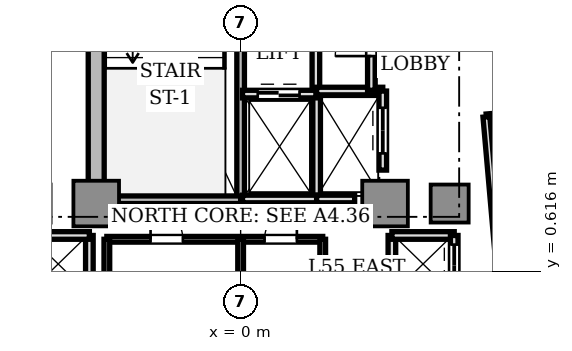
"""IFC4 building model, lengths in metres.
Left out: names, types, materials, properties, quantities, classifications, styles, units other than length and angle.
Written with IfcOpenShell. Run it as: python <this file> out.ifc"""

import sys

from ifc_helpers import new_model, si_unit, direction, frame, frame_2d, origin, origin_2d, place, context, subcontext, project, spatial, rectangle, extrude, source, transform, mapped, element, fill, save


model = new_model("IFC4")
c1 = context("Model", 3, precision=1e-05, world=origin(), true_north=direction((0.0, 1.0)))
c2 = subcontext(c1, "Body", "Model", "MODEL_VIEW")
j1 = project(units=[si_unit("LENGTHUNIT", "METRE"), si_unit("PLANEANGLEUNIT", "RADIAN")], contexts=[c1])
p1 = place(None, origin())
s1 = spatial("IfcSite", under=j1, at=p1, CompositionType="ELEMENT")
p2 = place(p1, origin())
s2 = spatial("IfcBuilding", under=s1, at=p2, CompositionType="ELEMENT")
p3 = place(p2, frame((0.0, 0.0, 198.65)))
s3 = spatial("IfcBuildingStorey", under=s2, at=p3, CompositionType="ELEMENT", Elevation=198.65)
p4 = place(p3, frame((-3.8, 2.85, 0.0), z_axis=(0.0, 0.0, 1.0), x_axis=(0.0, 1.0, 0.0)))
e1 = element("IfcWall", 1, at=p4, inside=s3, PredefinedType="SHEAR", context=c2, shape_type="SweptSolid", body=[
    extrude(rectangle(XDim=6.9, YDim=0.42, at=frame_2d((3.45, 0.0))), origin(), (0.0, 0.0, 1.0), 3.03),
])
m1 = source(origin(), c2, "Body", "SweptSolid", [
    extrude(rectangle(XDim=1.2, YDim=1.2, at=origin_2d()), origin(), (0.0, 0.0, 1.0), 3.03),
])
for number, where, z_axis, x_axis in (
    (2, (-3.8, 2.4, 0.0), (0.0, 0.0, 1.0), (1.0, 0.0, 0.0)),
    (3, (3.8, 2.4, 0.0), (0.0, 0.0, 1.0), (1.0, 0.0, 0.0)),
):
    element("IfcColumn", number, at=place(p3, frame(where, z_axis=z_axis, x_axis=x_axis)), inside=s3, PredefinedType="COLUMN", context=c2, shape_type="MappedRepresentation", body=[
        mapped(m1, transform((0.0, 0.0, 0.0), scale=1.0)),
    ])
m2 = source(origin(), c2, "Body", "SweptSolid", [
    extrude(rectangle(XDim=1.0, YDim=1.0, at=origin_2d()), origin(), (0.0, 0.0, 1.0), 3.03),
])
p5 = place(p3, frame((5.5, 2.4, 0.0), z_axis=(0.0, 0.0, 1.0), x_axis=(1.0, 0.0, 0.0)))
e4 = element("IfcColumn", 4, at=p5, inside=s3, PredefinedType="COLUMN", context=c2, shape_type="MappedRepresentation", body=[
    mapped(m2, transform((0.0, 0.0, 0.0), scale=1.0)),
])
p6 = place(p3, frame((0.0, 2.5, 0.0), z_axis=(0.0, 0.0, 1.0), x_axis=(0.0, 1.0, 0.0)))
e5 = element("IfcWall", 5, at=p6, inside=s3, PredefinedType="SOLIDWALL", context=c2, shape_type="SweptSolid", body=[
    extrude(rectangle(XDim=7.68, YDim=0.2, at=frame_2d((3.84, 0.0))), origin(), (0.0, 0.0, 1.0), 3.03),
])
p7 = place(p6, frame((6.36, 0.0, 0.0)))
e6 = element("IfcOpeningElement", 6, at=p7, cuts=e5, PredefinedType="OPENING", context=c2, shape_type="SweptSolid", body=[
    extrude(rectangle(XDim=1.1, YDim=2.15, at=frame_2d((0.55, 1.075))), frame((0.0, 0.11, 0.0), z_axis=(0.0, -1.0, 0.0), x_axis=(1.0, 0.0, 0.0)), (0.0, 0.0, 1.0), 0.22),
])
p8 = place(p3, frame((-3.72, 2.5, 0.0), z_axis=(0.0, 0.0, 1.0), x_axis=(1.0, 0.0, 0.0)))
e7 = element("IfcWall", 7, at=p8, inside=s3, PredefinedType="SOLIDWALL", context=c2, shape_type="SweptSolid", body=[
    extrude(rectangle(XDim=3.72, YDim=0.2, at=frame_2d((1.86, 0.0))), origin(), (0.0, 0.0, 1.0), 3.03),
])
p9 = place(p3, frame((1.98, 5.32, 0.0), z_axis=(0.0, 0.0, 1.0), x_axis=(0.0, 1.0, 0.0)))
e8 = element("IfcWall", 8, at=p9, inside=s3, PredefinedType="SOLIDWALL", context=c2, shape_type="SweptSolid", body=[
    extrude(rectangle(XDim=4.66, YDim=0.2, at=frame_2d((2.33, 0.0))), origin(), (0.0, 0.0, 1.0), 2.58),
])
p10 = place(p9, frame((3.04, 0.0, 0.0)))
e9 = element("IfcOpeningElement", 9, at=p10, cuts=e8, PredefinedType="OPENING", context=c2, shape_type="SweptSolid", body=[
    extrude(rectangle(XDim=0.85, YDim=2.1, at=frame_2d((0.425, 1.05))), frame((0.0, 0.11, 0.0), z_axis=(0.0, -1.0, 0.0), x_axis=(1.0, 0.0, 0.0)), (0.0, 0.0, 1.0), 0.22),
])
p11 = place(p3, frame((2.0, 2.5, 0.0), z_axis=(0.0, 0.0, 1.0), x_axis=(0.0, 1.0, 0.0)))
e10 = element("IfcWall", 10, at=p11, inside=s3, PredefinedType="SOLIDWALL", context=c2, shape_type="SweptSolid", body=[
    extrude(rectangle(XDim=2.78, YDim=0.2, at=frame_2d((1.39, 0.0))), origin(), (0.0, 0.0, 1.0), 2.58),
])
p12 = place(p3, frame((0.05, 2.52, 0.0), z_axis=(0.0, 0.0, 1.0), x_axis=(1.0, 0.0, 0.0)))
e11 = element("IfcWall", 11, at=p12, inside=s3, PredefinedType="SOLIDWALL", context=c2, shape_type="SweptSolid", body=[
    extrude(rectangle(XDim=1.95, YDim=0.2, at=frame_2d((0.975, 0.0))), origin(), (0.0, 0.0, 1.0), 2.58),
])
p13 = place(p3, frame((0.05, 5.28, 0.0), z_axis=(0.0, 0.0, 1.0), x_axis=(1.0, 0.0, 0.0)))
e12 = element("IfcWall", 12, at=p13, inside=s3, PredefinedType="SOLIDWALL", context=c2, shape_type="SweptSolid", body=[
    extrude(rectangle(XDim=1.93, YDim=0.2, at=frame_2d((0.965, 0.0))), origin(), (0.0, 0.0, 1.0), 2.58),
])
p14 = place(p13, frame((0.4, 0.0, 0.0)))
e13 = element("IfcOpeningElement", 13, at=p14, cuts=e12, PredefinedType="OPENING", context=c2, shape_type="SweptSolid", body=[
    extrude(rectangle(XDim=1.1, YDim=2.2, at=frame_2d((0.55, 1.1))), frame((0.0, 0.11, 0.0), z_axis=(0.0, -1.0, 0.0), x_axis=(1.0, 0.0, 0.0)), (0.0, 0.0, 1.0), 0.22),
])
p15 = place(p3, frame((2.0, 2.52, 0.0), z_axis=(0.0, 0.0, 1.0), x_axis=(1.0, 0.0, 0.0)))
e14 = element("IfcWall", 14, at=p15, inside=s3, PredefinedType="SOLIDWALL", context=c2, shape_type="SweptSolid", body=[
    extrude(rectangle(XDim=1.0, YDim=0.2, at=frame_2d((0.5, 0.0))), origin(), (0.0, 0.0, 1.0), 2.58),
])
p16 = place(p3, frame((2.0, 5.36, 0.0), z_axis=(0.0, 0.0, 1.0), x_axis=(1.0, 0.0, 0.0)))
e15 = element("IfcWall", 15, at=p16, inside=s3, PredefinedType="SOLIDWALL", context=c2, shape_type="SweptSolid", body=[
    extrude(rectangle(XDim=1.74, YDim=0.2, at=frame_2d((0.87, 0.0))), origin(), (0.0, 0.0, 1.0), 2.58),
])
p17 = place(p3, frame((3.74, 3.28, 0.0), z_axis=(0.0, 0.0, 1.0), x_axis=(0.0, 1.0, 0.0)))
e16 = element("IfcWall", 16, at=p17, inside=s3, PredefinedType="SOLIDWALL", context=c2, shape_type="SweptSolid", body=[
    extrude(rectangle(XDim=2.08, YDim=0.2, at=frame_2d((1.04, 0.0))), origin(), (0.0, 0.0, 1.0), 2.58),
])
p18 = place(p17, frame((0.44, 0.0, 0.0)))
e17 = element("IfcOpeningElement", 17, at=p18, cuts=e16, PredefinedType="OPENING", context=c2, shape_type="SweptSolid", body=[
    extrude(rectangle(XDim=1.2, YDim=2.2, at=frame_2d((0.6, 1.1))), frame((0.0, 0.11, 0.0), z_axis=(0.0, -1.0, 0.0), x_axis=(1.0, 0.0, 0.0)), (0.0, 0.0, 1.0), 0.22),
])
p19 = place(p3, frame((3.98, -1.56, 0.0), z_axis=(0.0, 0.0, 1.0), x_axis=(0.0, 1.0, 0.0)))
e18 = element("IfcWall", 18, at=p19, inside=s3, PredefinedType="SOLIDWALL", context=c2, shape_type="SweptSolid", body=[
    extrude(rectangle(XDim=3.12, YDim=0.2, at=frame_2d((1.56, 0.0))), origin(), (0.0, 0.0, 1.0), 2.2),
])
p20 = place(p3, frame((3.98, 1.56, 0.0), z_axis=(0.0, 0.0, 1.0), x_axis=(1.0, 0.0, 0.0)))
e19 = element("IfcWall", 19, at=p20, inside=s3, PredefinedType="SOLIDWALL", context=c2, shape_type="SweptSolid", body=[
    extrude(rectangle(XDim=1.64, YDim=0.2, at=frame_2d((0.82, 0.0))), origin(), (0.0, 0.0, 1.0), 2.58),
])
p21 = place(p3, frame((5.62, 0.0, 0.0), z_axis=(0.0, 0.0, 1.0), x_axis=(0.0, 1.0, 0.0)))
e20 = element("IfcWall", 20, at=p21, inside=s3, PredefinedType="SOLIDWALL", context=c2, shape_type="SweptSolid", body=[
    extrude(rectangle(XDim=1.56, YDim=0.2, at=frame_2d((0.78, 0.0))), origin(), (0.0, 0.0, 1.0), 2.58),
])
p22 = place(p21, frame((0.22, 0.0, 0.0)))
e21 = element("IfcOpeningElement", 21, at=p22, cuts=e20, PredefinedType="OPENING", context=c2, shape_type="SweptSolid", body=[
    extrude(rectangle(XDim=1.1, YDim=2.2, at=frame_2d((0.55, 1.1))), frame((0.0, 0.11, 0.0), z_axis=(0.0, -1.0, 0.0), x_axis=(1.0, 0.0, 0.0)), (0.0, 0.0, 1.0), 0.22),
])
p23 = place(p3, frame((-3.98, -1.56, 0.0), z_axis=(0.0, 0.0, 1.0), x_axis=(0.0, 1.0, 0.0)))
e22 = element("IfcWall", 22, at=p23, inside=s3, PredefinedType="SOLIDWALL", context=c2, shape_type="SweptSolid", body=[
    extrude(rectangle(XDim=3.12, YDim=0.2, at=frame_2d((1.56, 0.0))), origin(), (0.0, 0.0, 1.0), 2.2),
])
p24 = place(p3, frame((-5.62, 1.56, 0.0), z_axis=(0.0, 0.0, 1.0), x_axis=(1.0, 0.0, 0.0)))
e23 = element("IfcWall", 23, at=p24, inside=s3, PredefinedType="SOLIDWALL", context=c2, shape_type="SweptSolid", body=[
    extrude(rectangle(XDim=1.64, YDim=0.2, at=frame_2d((0.82, 0.0))), origin(), (0.0, 0.0, 1.0), 2.58),
])
p25 = place(p3, frame((3.44, 5.38, 0.0), z_axis=(0.0, 0.0, 1.0), x_axis=(0.0, 1.0, 0.0)))
e24 = element("IfcWall", 24, at=p25, inside=s3, PredefinedType="SOLIDWALL", context=c2, shape_type="SweptSolid", body=[
    extrude(rectangle(XDim=2.77, YDim=0.2, at=frame_2d((1.385, 0.0))), origin(), (0.0, 0.0, 1.0), 2.58),
])
p26 = place(p25, frame((0.9, 0.0, 0.0)))
e25 = element("IfcOpeningElement", 25, at=p26, cuts=e24, PredefinedType="OPENING", context=c2, shape_type="SweptSolid", body=[
    extrude(rectangle(XDim=0.95, YDim=2.15, at=frame_2d((0.475, 1.075))), frame((0.0, 0.11, 0.0), z_axis=(0.0, -1.0, 0.0), x_axis=(1.0, 0.0, 0.0)), (0.0, 0.0, 1.0), 0.22),
])
p27 = place(p3, frame((-3.52, 1.46, 0.0), z_axis=(0.0, 0.0, 1.0), x_axis=(1.0, 0.0, 0.0)))
e26 = element("IfcWall", 26, at=p27, inside=s3, PredefinedType="PARTITIONING", context=c2, shape_type="SweptSolid", body=[
    extrude(rectangle(XDim=5.68, YDim=0.15, at=frame_2d((2.84, 0.0))), origin(), (0.0, 0.0, 1.0), 2.58),
])
p28 = place(p27, frame((1.15, 0.0, 0.0)))
e27 = element("IfcOpeningElement", 27, at=p28, cuts=e26, PredefinedType="OPENING", context=c2, shape_type="SweptSolid", body=[
    extrude(rectangle(XDim=0.85, YDim=2.1, at=frame_2d((0.425, 1.05))), frame((0.0, 0.085, 0.0), z_axis=(0.0, -1.0, 0.0), x_axis=(1.0, 0.0, 0.0)), (0.0, 0.0, 1.0), 0.17),
])
p29 = place(p27, frame((4.15, 0.0, 0.0)))
e28 = element("IfcOpeningElement", 28, at=p29, cuts=e26, PredefinedType="OPENING", context=c2, shape_type="SweptSolid", body=[
    extrude(rectangle(XDim=0.85, YDim=2.1, at=frame_2d((0.425, 1.05))), frame((0.0, 0.085, 0.0), z_axis=(0.0, -1.0, 0.0), x_axis=(1.0, 0.0, 0.0)), (0.0, 0.0, 1.0), 0.17),
])
p30 = place(p3, frame((-3.52, 0.1, 0.0), z_axis=(0.0, 0.0, 1.0), x_axis=(0.0, 1.0, 0.0)))
e29 = element("IfcWall", 29, at=p30, inside=s3, PredefinedType="PARTITIONING", context=c2, shape_type="SweptSolid", body=[
    extrude(rectangle(XDim=1.36, YDim=0.15, at=frame_2d((0.68, 0.0))), origin(), (0.0, 0.0, 1.0), 2.2),
])
for number, where, z_axis, x_axis in (
    (30, (2.16, 0.1, 0.0), (0.0, 0.0, 1.0), (0.0, 1.0, 0.0)),
    (31, (0.0, 0.1, 0.0), (0.0, 0.0, 1.0), (0.0, 1.0, 0.0)),
):
    element("IfcWall", number, at=place(p3, frame(where, z_axis=z_axis, x_axis=x_axis)), inside=s3, PredefinedType="PARTITIONING", context=c2, shape_type="SweptSolid", body=[
        extrude(rectangle(XDim=1.36, YDim=0.15, at=frame_2d((0.68, 0.0))), origin(), (0.0, 0.0, 1.0), 2.58),
    ])
p31 = place(p3, frame((6.467, 4.681, 0.0), z_axis=(0.0, 0.0, 1.0), x_axis=(0.996195452949, 0.087147114263, 0.0)))
e32 = element("IfcWall", 32, at=p31, inside=s3, PredefinedType="PARTITIONING", context=c2, shape_type="SweptSolid", body=[
    extrude(rectangle(XDim=8.55, YDim=0.15, at=frame_2d((4.275, 0.0))), origin(), (0.0, 0.0, 1.0), 2.58),
])
p32 = place(p31, frame((1.491, 0.0, 0.0)))
e33 = element("IfcOpeningElement", 33, at=p32, cuts=e32, PredefinedType="OPENING", context=c2, shape_type="SweptSolid", body=[
    extrude(rectangle(XDim=0.85, YDim=2.1, at=frame_2d((0.425, 1.05))), frame((0.0, 0.085, 0.0), z_axis=(0.0, -1.0, 0.0), x_axis=(1.0, 0.0, 0.0)), (0.0, 0.0, 1.0), 0.17),
])
p33 = place(p31, frame((4.792, 0.0, 0.0)))
e34 = element("IfcOpeningElement", 34, at=p33, cuts=e32, PredefinedType="OPENING", context=c2, shape_type="SweptSolid", body=[
    extrude(rectangle(XDim=0.85, YDim=2.1, at=frame_2d((0.425, 1.05))), frame((0.0, 0.085, 0.0), z_axis=(0.0, -1.0, 0.0), x_axis=(1.0, 0.0, 0.0)), (0.0, 0.0, 1.0), 0.17),
])
p34 = place(p3, frame((7.373, -5.679, 0.0), z_axis=(0.0, 0.0, 1.0), x_axis=(-0.087163455754, 0.996194023261, 0.0)))
e35 = element("IfcWall", 35, at=p34, inside=s3, PredefinedType="PARTITIONING", context=c2, shape_type="SweptSolid", body=[
    extrude(rectangle(XDim=10.4, YDim=0.18, at=frame_2d((5.2, 0.0))), origin(), (0.0, 0.0, 1.0), 2.58),
])
m3 = source(origin(), c2, "Body", "SweptSolid", [
    extrude(rectangle(XDim=1.1, YDim=0.05, at=origin_2d()), origin(), (0.0, 0.0, 1.0), 2.2),
])
p35 = place(p14, frame((0.55, 0.0, 0.0)))
e36 = element("IfcDoor", 36, at=p35, inside=s3, OperationType="DOUBLE_DOOR_SLIDING", PredefinedType="DOOR", context=c2, shape_type="MappedRepresentation", body=[
    mapped(m3, transform((0.0, 0.0, 0.0), scale=1.0)),
])
fill(e13, e36)
m4 = source(origin(), c2, "Body", "SweptSolid", [
    extrude(rectangle(XDim=1.2, YDim=0.05, at=origin_2d()), origin(), (0.0, 0.0, 1.0), 2.2),
])
p36 = place(p18, frame((0.6, 0.0, 0.0)))
e37 = element("IfcDoor", 37, at=p36, inside=s3, OperationType="DOUBLE_DOOR_SLIDING", PredefinedType="DOOR", context=c2, shape_type="MappedRepresentation", body=[
    mapped(m4, transform((0.0, 0.0, 0.0), scale=1.0)),
])
fill(e17, e37)
p37 = place(p22, frame((0.55, 0.0, 0.0)))
e38 = element("IfcDoor", 38, at=p37, inside=s3, OperationType="DOUBLE_DOOR_SLIDING", PredefinedType="DOOR", context=c2, shape_type="MappedRepresentation", body=[
    mapped(m3, transform((0.0, 0.0, 0.0), scale=1.0)),
])
fill(e21, e38)
m5 = source(origin(), c2, "Body", "SweptSolid", [
    extrude(rectangle(XDim=0.95, YDim=0.05, at=origin_2d()), origin(), (0.0, 0.0, 1.0), 2.15),
])
p38 = place(p26, frame((0.475, 0.0, 0.0)))
e39 = element("IfcDoor", 39, at=p38, inside=s3, OperationType="SINGLE_SWING_LEFT", PredefinedType="DOOR", context=c2, shape_type="MappedRepresentation", body=[
    mapped(m5, transform((0.0, 0.0, 0.0), scale=1.0)),
])
fill(e25, e39)
m6 = source(origin(), c2, "Body", "SweptSolid", [
    extrude(rectangle(XDim=0.85, YDim=0.05, at=origin_2d()), origin(), (0.0, 0.0, 1.0), 2.1),
])
p39 = place(p28, frame((0.425, 0.0, 0.0)))
e40 = element("IfcDoor", 40, at=p39, inside=s3, OperationType="SINGLE_SWING_LEFT", PredefinedType="DOOR", context=c2, shape_type="MappedRepresentation", body=[
    mapped(m6, transform((0.0, 0.0, 0.0), scale=1.0)),
])
fill(e27, e40)
p40 = place(p29, frame((0.425, 0.0, 0.0)))
e41 = element("IfcDoor", 41, at=p40, inside=s3, OperationType="SINGLE_SWING_RIGHT", PredefinedType="DOOR", context=c2, shape_type="MappedRepresentation", body=[
    mapped(m6, transform((0.0, 0.0, 0.0), scale=1.0)),
])
fill(e28, e41)
save(model, sys.argv[1])
